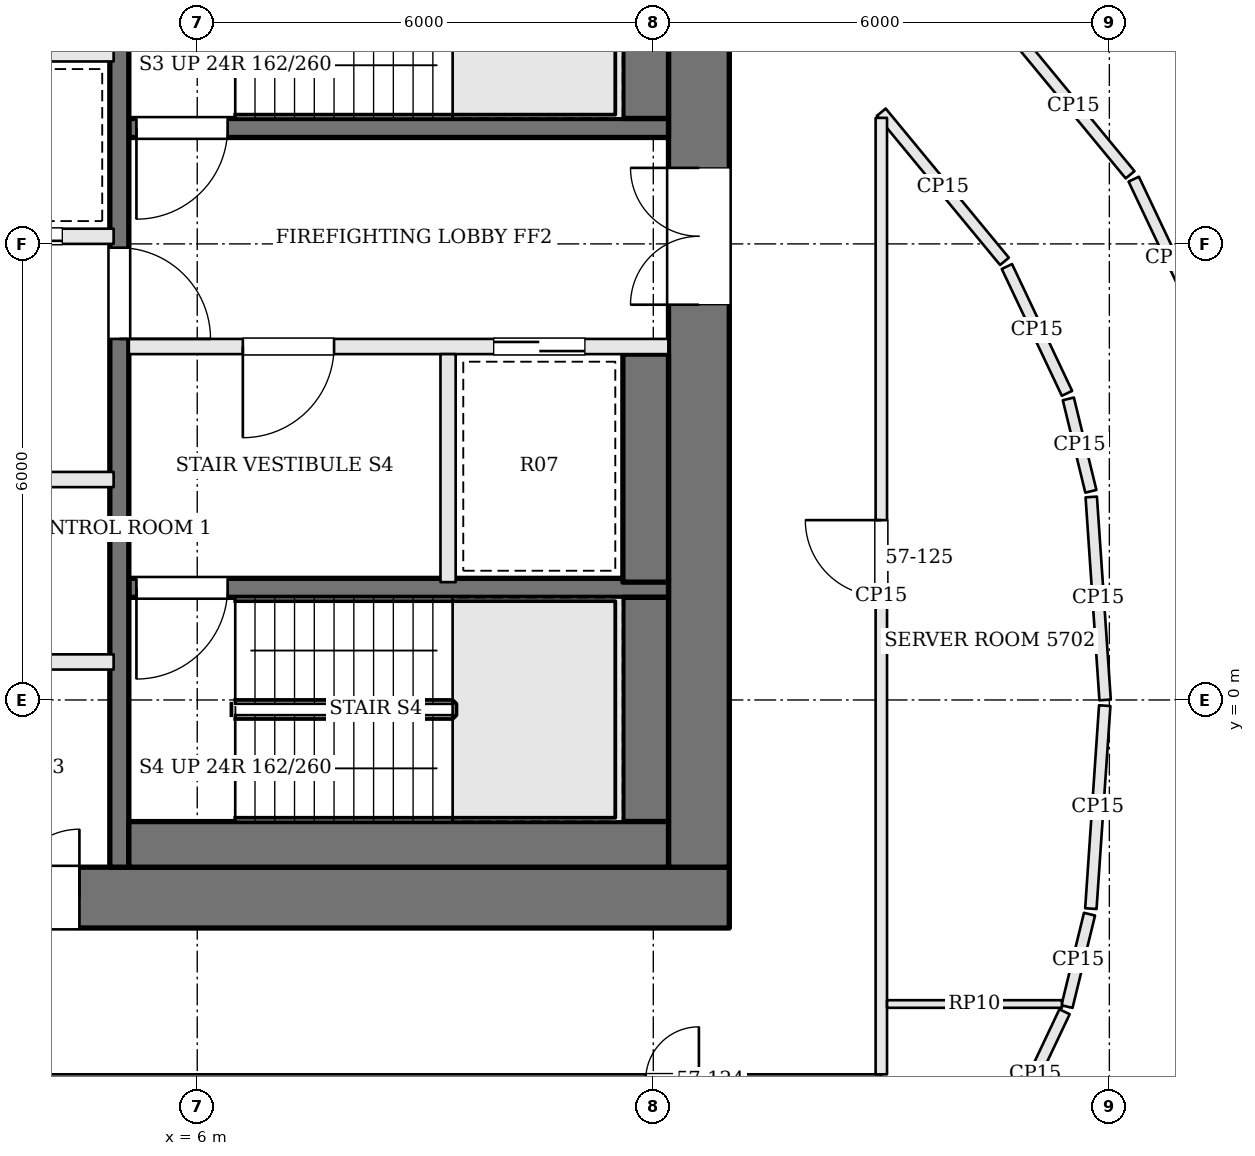
"""IFC4 building model, lengths in metres.
Left out: names, types, materials, properties, quantities, classifications, styles, units other than length and angle.
Written with IfcOpenShell. Run it as: python <this file> out.ifc"""

import sys

from ifc_helpers import new_model, si_unit, direction, frame, frame_2d, origin, place, context, subcontext, project, spatial, rectangle, extrude, element, fill, save


model = new_model("IFC4")
c1 = context("Model", 3, precision=1e-05, world=origin(), true_north=direction((0.0, 1.0)))
c2 = subcontext(c1, "Body", "Model", "MODEL_VIEW")
j1 = project(units=[si_unit("LENGTHUNIT", "METRE"), si_unit("PLANEANGLEUNIT", "RADIAN")], contexts=[c1])
p1 = place(None, origin())
s1 = spatial("IfcSite", under=j1, at=p1, CompositionType="ELEMENT")
p2 = place(p1, origin())
s2 = spatial("IfcBuilding", under=s1, at=p2, CompositionType="ELEMENT")
p3 = place(p2, frame((0.0, 0.0, 233.1)))
s3 = spatial("IfcBuildingStorey", under=s2, at=p3, CompositionType="ELEMENT", Elevation=233.1)
p4 = place(p3, frame((-13.0, -2.6, 0.0), z_axis=(0.0, 0.0, 1.0), x_axis=(1.0, 0.0, 0.0)))
e1 = element("IfcWall", 1, at=p4, inside=s3, PredefinedType="SHEAR", context=c2, shape_type="SweptSolid", body=[
    extrude(rectangle(XDim=26.0, YDim=0.8, at=frame_2d((13.0, 0.0))), origin(), (0.0, 0.0, 1.0), 3.9),
])
p5 = place(p4, frame((9.2, 0.0, 0.0)))
e2 = element("IfcOpeningElement", 2, at=p5, cuts=e1, PredefinedType="OPENING", context=c2, shape_type="SweptSolid", body=[
    extrude(rectangle(XDim=0.9, YDim=2.1, at=frame_2d((0.45, 1.05))), frame((0.0, 0.41, 0.0), z_axis=(0.0, -1.0, 0.0), x_axis=(1.0, 0.0, 0.0)), (0.0, 0.0, 1.0), 0.82),
])
p6 = place(p4, frame((12.3, 0.0, 0.0)))
e3 = element("IfcOpeningElement", 3, at=p6, cuts=e1, PredefinedType="OPENING", context=c2, shape_type="SweptSolid", body=[
    extrude(rectangle(XDim=0.9, YDim=2.1, at=frame_2d((0.45, 1.05))), frame((0.0, 0.41, 0.0), z_axis=(0.0, -1.0, 0.0), x_axis=(1.0, 0.0, 0.0)), (0.0, 0.0, 1.0), 0.82),
])
p7 = place(p4, frame((14.7, 0.0, 0.0)))
e4 = element("IfcOpeningElement", 4, at=p7, cuts=e1, PredefinedType="OPENING", context=c2, shape_type="SweptSolid", body=[
    extrude(rectangle(XDim=1.0, YDim=2.1, at=frame_2d((0.5, 1.05))), frame((0.0, 0.41, 0.0), z_axis=(0.0, -1.0, 0.0), x_axis=(1.0, 0.0, 0.0)), (0.0, 0.0, 1.0), 0.82),
])
p8 = place(p4, frame((16.55, 0.0, 0.0)))
e5 = element("IfcOpeningElement", 5, at=p8, cuts=e1, PredefinedType="OPENING", context=c2, shape_type="SweptSolid", body=[
    extrude(rectangle(XDim=0.9, YDim=2.1, at=frame_2d((0.45, 1.05))), frame((0.0, 0.41, 0.0), z_axis=(0.0, -1.0, 0.0), x_axis=(1.0, 0.0, 0.0)), (0.0, 0.0, 1.0), 0.82),
])
p9 = place(p3, frame((12.6, -2.2, 0.0), z_axis=(0.0, 0.0, 1.0), x_axis=(0.0, 1.0, 0.0)))
e6 = element("IfcWall", 6, at=p9, inside=s3, PredefinedType="SHEAR", context=c2, shape_type="SweptSolid", body=[
    extrude(rectangle(XDim=13.4, YDim=0.8, at=frame_2d((6.7, 0.0))), origin(), (0.0, 0.0, 1.0), 3.9),
])
p10 = place(p9, frame((7.4, 0.0, 0.0)))
e7 = element("IfcOpeningElement", 7, at=p10, cuts=e6, PredefinedType="OPENING", context=c2, shape_type="SweptSolid", body=[
    extrude(rectangle(XDim=1.8, YDim=2.1, at=frame_2d((0.9, 1.05))), frame((0.0, 0.41, 0.0), z_axis=(0.0, -1.0, 0.0), x_axis=(1.0, 0.0, 0.0)), (0.0, 0.0, 1.0), 0.82),
])
p11 = place(p3, frame((12.2, 7.525, 0.0), z_axis=(0.0, 0.0, 1.0), x_axis=(-1.0, 0.0, 0.0)))
e8 = element("IfcWall", 8, at=p11, inside=s3, PredefinedType="SOLIDWALL", context=c2, shape_type="SweptSolid", body=[
    extrude(rectangle(XDim=7.1, YDim=0.25, at=frame_2d((3.55, 0.0))), origin(), (0.0, 0.0, 1.0), 3.7),
])
p12 = place(p11, frame((5.8, 0.0, 0.0)))
e9 = element("IfcOpeningElement", 9, at=p12, cuts=e8, PredefinedType="OPENING", context=c2, shape_type="SweptSolid", body=[
    extrude(rectangle(XDim=1.2, YDim=2.1, at=frame_2d((0.6, 1.05))), frame((0.0, 0.135, 0.0), z_axis=(0.0, -1.0, 0.0), x_axis=(1.0, 0.0, 0.0)), (0.0, 0.0, 1.0), 0.27),
])
p13 = place(p3, frame((12.2, 4.65, 0.0), z_axis=(0.0, 0.0, 1.0), x_axis=(-1.0, 0.0, 0.0)))
e10 = element("IfcWall", 10, at=p13, inside=s3, PredefinedType="SOLIDWALL", context=c2, shape_type="SweptSolid", body=[
    extrude(rectangle(XDim=7.1, YDim=0.2, at=frame_2d((3.55, 0.0))), origin(), (0.0, 0.0, 1.0), 3.7),
])
p14 = place(p13, frame((4.4, 0.0, 0.0)))
e11 = element("IfcOpeningElement", 11, at=p14, cuts=e10, PredefinedType="OPENING", context=c2, shape_type="SweptSolid", body=[
    extrude(rectangle(XDim=1.2, YDim=2.1, at=frame_2d((0.6, 1.05))), frame((0.0, 0.11, 0.0), z_axis=(0.0, -1.0, 0.0), x_axis=(1.0, 0.0, 0.0)), (0.0, 0.0, 1.0), 0.22),
])
p15 = place(p13, frame((1.1, 0.0, 0.0)))
e12 = element("IfcOpeningElement", 12, at=p15, cuts=e10, PredefinedType="OPENING", context=c2, shape_type="SweptSolid", body=[
    extrude(rectangle(XDim=1.2, YDim=2.1, at=frame_2d((0.6, 1.05))), frame((0.0, 0.11, 0.0), z_axis=(0.0, -1.0, 0.0), x_axis=(1.0, 0.0, 0.0)), (0.0, 0.0, 1.0), 0.22),
])
p16 = place(p3, frame((12.2, 1.475, 0.0), z_axis=(0.0, 0.0, 1.0), x_axis=(-1.0, 0.0, 0.0)))
e13 = element("IfcWall", 13, at=p16, inside=s3, PredefinedType="SOLIDWALL", context=c2, shape_type="SweptSolid", body=[
    extrude(rectangle(XDim=7.1, YDim=0.25, at=frame_2d((3.55, 0.0))), origin(), (0.0, 0.0, 1.0), 3.7),
])
p17 = place(p16, frame((5.8, 0.0, 0.0)))
e14 = element("IfcOpeningElement", 14, at=p17, cuts=e13, PredefinedType="OPENING", context=c2, shape_type="SweptSolid", body=[
    extrude(rectangle(XDim=1.2, YDim=2.1, at=frame_2d((0.6, 1.05))), frame((0.0, 0.135, 0.0), z_axis=(0.0, -1.0, 0.0), x_axis=(1.0, 0.0, 0.0)), (0.0, 0.0, 1.0), 0.27),
])
p18 = place(p3, frame((9.3, 4.55, 0.0), z_axis=(0.0, 0.0, 1.0), x_axis=(0.0, -1.0, 0.0)))
e15 = element("IfcWall", 15, at=p18, inside=s3, PredefinedType="SOLIDWALL", context=c2, shape_type="SweptSolid", body=[
    extrude(rectangle(XDim=3.0, YDim=0.2, at=frame_2d((1.5, 0.0))), origin(), (0.0, 0.0, 1.0), 3.7),
])
p19 = place(p3, frame((4.975, 11.2, 0.0), z_axis=(0.0, 0.0, 1.0), x_axis=(0.0, -1.0, 0.0)))
e16 = element("IfcWall", 16, at=p19, inside=s3, PredefinedType="SOLIDWALL", context=c2, shape_type="SweptSolid", body=[
    extrude(rectangle(XDim=13.4, YDim=0.25, at=frame_2d((6.7, 0.0))), origin(), (0.0, 0.0, 1.0), 3.7),
])
p20 = place(p19, frame((5.25, 0.0, 0.0)))
e17 = element("IfcOpeningElement", 17, at=p20, cuts=e16, PredefinedType="OPENING", context=c2, shape_type="SweptSolid", body=[
    extrude(rectangle(XDim=1.2, YDim=2.1, at=frame_2d((0.6, 1.05))), frame((0.0, 0.135, 0.0), z_axis=(0.0, -1.0, 0.0), x_axis=(1.0, 0.0, 0.0)), (0.0, 0.0, 1.0), 0.27),
])
p21 = place(p3, frame((11.9, 10.6, 0.0), z_axis=(0.0, 0.0, 1.0), x_axis=(0.0, -1.0, 0.0)))
e18 = element("IfcWall", 18, at=p21, inside=s3, PredefinedType="SOLIDWALL", context=c2, shape_type="SweptSolid", body=[
    extrude(rectangle(XDim=2.95, YDim=0.6, at=frame_2d((1.475, 0.0))), origin(), (0.0, 0.0, 1.0), 3.7),
])
p22 = place(p3, frame((11.9, 4.55, 0.0), z_axis=(0.0, 0.0, 1.0), x_axis=(0.0, -1.0, 0.0)))
e19 = element("IfcWall", 19, at=p22, inside=s3, PredefinedType="SOLIDWALL", context=c2, shape_type="SweptSolid", body=[
    extrude(rectangle(XDim=3.0, YDim=0.6, at=frame_2d((1.5, 0.0))), origin(), (0.0, 0.0, 1.0), 3.7),
])
p23 = place(p3, frame((11.9, 1.35, 0.0), z_axis=(0.0, 0.0, 1.0), x_axis=(0.0, -1.0, 0.0)))
e20 = element("IfcWall", 20, at=p23, inside=s3, PredefinedType="SOLIDWALL", context=c2, shape_type="SweptSolid", body=[
    extrude(rectangle(XDim=2.95, YDim=0.6, at=frame_2d((1.475, 0.0))), origin(), (0.0, 0.0, 1.0), 3.7),
])
p24 = place(p3, frame((12.2, -1.9, 0.0), z_axis=(0.0, 0.0, 1.0), x_axis=(-1.0, 0.0, 0.0)))
e21 = element("IfcWall", 21, at=p24, inside=s3, PredefinedType="SOLIDWALL", context=c2, shape_type="SweptSolid", body=[
    extrude(rectangle(XDim=7.1, YDim=0.6, at=frame_2d((3.55, 0.0))), origin(), (0.0, 0.0, 1.0), 3.7),
])
p25 = place(p3, frame((-4.9, 0.5, 0.0), z_axis=(0.0, 0.0, 1.0), x_axis=(1.0, 0.0, 0.0)))
e22 = element("IfcWall", 22, at=p25, inside=s3, PredefinedType="SOLIDWALL", context=c2, shape_type="SweptSolid", body=[
    extrude(rectangle(XDim=9.8, YDim=0.2, at=frame_2d((4.9, 0.0))), origin(), (0.0, 0.0, 1.0), 3.7),
])
p26 = place(p3, frame((-4.9, 2.9, 0.0), z_axis=(0.0, 0.0, 1.0), x_axis=(1.0, 0.0, 0.0)))
e23 = element("IfcWall", 23, at=p26, inside=s3, PredefinedType="SOLIDWALL", context=c2, shape_type="SweptSolid", body=[
    extrude(rectangle(XDim=9.8, YDim=0.2, at=frame_2d((4.9, 0.0))), origin(), (0.0, 0.0, 1.0), 3.7),
])
p27 = place(p26, frame((0.675, 0.0, 0.0)))
e24 = element("IfcOpeningElement", 24, at=p27, cuts=e23, PredefinedType="OPENING", context=c2, shape_type="SweptSolid", body=[
    extrude(rectangle(XDim=1.1, YDim=2.1, at=frame_2d((0.55, 1.05))), frame((0.0, 0.11, 0.0), z_axis=(0.0, -1.0, 0.0), x_axis=(1.0, 0.0, 0.0)), (0.0, 0.0, 1.0), 0.22),
])
p28 = place(p26, frame((2.613, 0.0, 0.0)))
e25 = element("IfcOpeningElement", 25, at=p28, cuts=e23, PredefinedType="OPENING", context=c2, shape_type="SweptSolid", body=[
    extrude(rectangle(XDim=0.9, YDim=2.1, at=frame_2d((0.45, 1.05))), frame((0.0, 0.11, 0.0), z_axis=(0.0, -1.0, 0.0), x_axis=(1.0, 0.0, 0.0)), (0.0, 0.0, 1.0), 0.22),
])
p29 = place(p26, frame((4.35, 0.0, 0.0)))
e26 = element("IfcOpeningElement", 26, at=p29, cuts=e23, PredefinedType="OPENING", context=c2, shape_type="SweptSolid", body=[
    extrude(rectangle(XDim=1.1, YDim=2.1, at=frame_2d((0.55, 1.05))), frame((0.0, 0.11, 0.0), z_axis=(0.0, -1.0, 0.0), x_axis=(1.0, 0.0, 0.0)), (0.0, 0.0, 1.0), 0.22),
])
p30 = place(p26, frame((7.463, 0.0, 0.0)))
e27 = element("IfcOpeningElement", 27, at=p30, cuts=e23, PredefinedType="OPENING", context=c2, shape_type="SweptSolid", body=[
    extrude(rectangle(XDim=1.0, YDim=2.1, at=frame_2d((0.5, 1.05))), frame((0.0, 0.11, 0.0), z_axis=(0.0, -1.0, 0.0), x_axis=(1.0, 0.0, 0.0)), (0.0, 0.0, 1.0), 0.22),
])
p31 = place(p3, frame((-4.9, 6.1, 0.0), z_axis=(0.0, 0.0, 1.0), x_axis=(1.0, 0.0, 0.0)))
e28 = element("IfcWall", 28, at=p31, inside=s3, PredefinedType="SOLIDWALL", context=c2, shape_type="SweptSolid", body=[
    extrude(rectangle(XDim=9.8, YDim=0.2, at=frame_2d((4.9, 0.0))), origin(), (0.0, 0.0, 1.0), 3.7),
])
p32 = place(p31, frame((0.675, 0.0, 0.0)))
e29 = element("IfcOpeningElement", 29, at=p32, cuts=e28, PredefinedType="OPENING", context=c2, shape_type="SweptSolid", body=[
    extrude(rectangle(XDim=1.1, YDim=2.1, at=frame_2d((0.55, 1.05))), frame((0.0, 0.11, 0.0), z_axis=(0.0, -1.0, 0.0), x_axis=(1.0, 0.0, 0.0)), (0.0, 0.0, 1.0), 0.22),
])
p33 = place(p31, frame((3.125, 0.0, 0.0)))
e30 = element("IfcOpeningElement", 30, at=p33, cuts=e28, PredefinedType="OPENING", context=c2, shape_type="SweptSolid", body=[
    extrude(rectangle(XDim=1.1, YDim=2.1, at=frame_2d((0.55, 1.05))), frame((0.0, 0.11, 0.0), z_axis=(0.0, -1.0, 0.0), x_axis=(1.0, 0.0, 0.0)), (0.0, 0.0, 1.0), 0.22),
])
p34 = place(p31, frame((5.575, 0.0, 0.0)))
e31 = element("IfcOpeningElement", 31, at=p34, cuts=e28, PredefinedType="OPENING", context=c2, shape_type="SweptSolid", body=[
    extrude(rectangle(XDim=1.1, YDim=2.1, at=frame_2d((0.55, 1.05))), frame((0.0, 0.11, 0.0), z_axis=(0.0, -1.0, 0.0), x_axis=(1.0, 0.0, 0.0)), (0.0, 0.0, 1.0), 0.22),
])
p35 = place(p31, frame((8.025, 0.0, 0.0)))
e32 = element("IfcOpeningElement", 32, at=p35, cuts=e28, PredefinedType="OPENING", context=c2, shape_type="SweptSolid", body=[
    extrude(rectangle(XDim=1.1, YDim=2.1, at=frame_2d((0.55, 1.05))), frame((0.0, 0.11, 0.0), z_axis=(0.0, -1.0, 0.0), x_axis=(1.0, 0.0, 0.0)), (0.0, 0.0, 1.0), 0.22),
])
p36 = place(p3, frame((-4.9, 8.5, 0.0), z_axis=(0.0, 0.0, 1.0), x_axis=(1.0, 0.0, 0.0)))
e33 = element("IfcWall", 33, at=p36, inside=s3, PredefinedType="SOLIDWALL", context=c2, shape_type="SweptSolid", body=[
    extrude(rectangle(XDim=9.8, YDim=0.2, at=frame_2d((4.9, 0.0))), origin(), (0.0, 0.0, 1.0), 3.7),
])
for number, where, z_axis, x_axis in (
    (34, (18.353, -6.784, 0.0), (0.0, 0.0, 1.0), (0.428, 0.904, 0.0)),
    (35, (19.305, 4.773, 0.0), (0.0, 0.0, 1.0), (-0.428, 0.904, 0.0)),
):
    element("IfcWall", number, at=place(p3, frame(where, z_axis=z_axis, x_axis=x_axis)), inside=s3, PredefinedType="PARTITIONING", context=c2, shape_type="SweptSolid", body=[
        extrude(rectangle(XDim=2.3, YDim=0.15, at=frame_2d((1.15, 0.0))), origin(), (0.0, 0.0, 1.0), 3.084),
    ])
p37 = place(p3, frame((18.273, 6.909, 0.0), z_axis=(0.0, 0.0, 1.0), x_axis=(-0.63653648943, 0.771246586783, 0.0)))
e36 = element("IfcWall", 36, at=p37, inside=s3, PredefinedType="PARTITIONING", context=c2, shape_type="SweptSolid", body=[
    extrude(rectangle(XDim=2.342, YDim=0.15, at=frame_2d((1.171, 0.0))), origin(), (0.0, 0.0, 1.0), 3.084),
])
p38 = place(p3, frame((15.0, 7.733, 0.0), z_axis=(0.0, 0.0, 1.0), x_axis=(0.636601263488, -0.771193121938, 0.0)))
e37 = element("IfcWall", 37, at=p38, inside=s3, PredefinedType="PARTITIONING", context=c2, shape_type="SweptSolid", body=[
    extrude(rectangle(XDim=2.545, YDim=0.15, at=frame_2d((1.272, 0.0))), origin(), (0.0, 0.0, 1.0), 3.084),
])
p39 = place(p3, frame((16.652, 5.702, 0.0), z_axis=(0.0, 0.0, 1.0), x_axis=(0.428126129773, -0.903718992279, 0.0)))
e38 = element("IfcWall", 38, at=p39, inside=s3, PredefinedType="PARTITIONING", context=c2, shape_type="SweptSolid", body=[
    extrude(rectangle(XDim=1.846, YDim=0.15, at=frame_2d((0.923, 0.0))), origin(), (0.0, 0.0, 1.0), 3.084),
])
p40 = place(p3, frame((17.46, 3.961, 0.0), z_axis=(0.0, 0.0, 1.0), x_axis=(0.236655249498, -0.971593687137, 0.0)))
e39 = element("IfcWall", 39, at=p40, inside=s3, PredefinedType="PARTITIONING", context=c2, shape_type="SweptSolid", body=[
    extrude(rectangle(XDim=1.251, YDim=0.15, at=frame_2d((0.626, 0.0))), origin(), (0.0, 0.0, 1.0), 3.084),
])
p41 = place(p3, frame((17.762, 2.67, 0.0), z_axis=(0.0, 0.0, 1.0), x_axis=(0.068135311644, -0.997676089373, 0.0)))
e40 = element("IfcWall", 40, at=p41, inside=s3, PredefinedType="PARTITIONING", context=c2, shape_type="SweptSolid", body=[
    extrude(rectangle(XDim=2.677, YDim=0.15, at=frame_2d((1.338, 0.0))), origin(), (0.0, 0.0, 1.0), 3.084),
])
p42 = place(p3, frame((17.939, -0.075, 0.0), z_axis=(0.0, 0.0, 1.0), x_axis=(-0.068226099283, -0.99766988497, 0.0)))
e41 = element("IfcWall", 41, at=p42, inside=s3, PredefinedType="PARTITIONING", context=c2, shape_type="SweptSolid", body=[
    extrude(rectangle(XDim=2.677, YDim=0.15, at=frame_2d((1.338, 0.0))), origin(), (0.0, 0.0, 1.0), 3.084),
])
p43 = place(p3, frame((17.739, -2.818, 0.0), z_axis=(0.0, 0.0, 1.0), x_axis=(-0.236884307907, -0.971537865792, 0.0)))
e42 = element("IfcWall", 42, at=p43, inside=s3, PredefinedType="PARTITIONING", context=c2, shape_type="SweptSolid", body=[
    extrude(rectangle(XDim=1.251, YDim=0.15, at=frame_2d((0.625, 0.0))), origin(), (0.0, 0.0, 1.0), 3.084),
])
p44 = place(p3, frame((17.41, -4.102, 0.0), z_axis=(0.0, 0.0, 1.0), x_axis=(-0.428074720318, -0.903743345107, 0.0)))
e43 = element("IfcWall", 43, at=p44, inside=s3, PredefinedType="PARTITIONING", context=c2, shape_type="SweptSolid", body=[
    extrude(rectangle(XDim=1.806, YDim=0.15, at=frame_2d((0.903, 0.0))), origin(), (0.0, 0.0, 1.0), 3.084),
])
p45 = place(p3, frame((-14.925, -5.0, 0.0), z_axis=(0.0, 0.0, 1.0), x_axis=(1.0, 0.0, 0.0)))
e44 = element("IfcWall", 44, at=p45, inside=s3, PredefinedType="PARTITIONING", context=c2, shape_type="SweptSolid", body=[
    extrude(rectangle(XDim=29.925, YDim=0.15, at=frame_2d((14.962, 0.0))), origin(), (0.0, 0.0, 1.0), 3.084),
])
p46 = place(p45, frame((2.175, 0.0, 0.0)))
e45 = element("IfcOpeningElement", 45, at=p46, cuts=e44, PredefinedType="OPENING", context=c2, shape_type="SweptSolid", body=[
    extrude(rectangle(XDim=1.0, YDim=2.4, at=frame_2d((0.5, 1.2))), frame((0.0, 0.085, 0.0), z_axis=(0.0, -1.0, 0.0), x_axis=(1.0, 0.0, 0.0)), (0.0, 0.0, 1.0), 0.17),
])
p47 = place(p45, frame((14.025, 0.0, 0.0)))
e46 = element("IfcOpeningElement", 46, at=p47, cuts=e44, PredefinedType="OPENING", context=c2, shape_type="SweptSolid", body=[
    extrude(rectangle(XDim=1.8, YDim=2.1, at=frame_2d((0.9, 1.05))), frame((0.0, 0.085, 0.0), z_axis=(0.0, -1.0, 0.0), x_axis=(1.0, 0.0, 0.0)), (0.0, 0.0, 1.0), 0.17),
])
p48 = place(p45, frame((26.825, 0.0, 0.0)))
e47 = element("IfcOpeningElement", 47, at=p48, cuts=e44, PredefinedType="OPENING", context=c2, shape_type="SweptSolid", body=[
    extrude(rectangle(XDim=0.7, YDim=2.1, at=frame_2d((0.35, 1.05))), frame((0.0, 0.085, 0.0), z_axis=(0.0, -1.0, 0.0), x_axis=(1.0, 0.0, 0.0)), (0.0, 0.0, 1.0), 0.17),
])
p49 = place(p3, frame((15.0, -4.925, 0.0), z_axis=(0.0, 0.0, 1.0), x_axis=(0.0, 1.0, 0.0)))
e48 = element("IfcWall", 48, at=p49, inside=s3, PredefinedType="PARTITIONING", context=c2, shape_type="SweptSolid", body=[
    extrude(rectangle(XDim=12.583, YDim=0.15, at=frame_2d((6.292, 0.0))), origin(), (0.0, 0.0, 1.0), 3.084),
])
p50 = place(p49, frame((6.291, 0.0, 0.0)))
e49 = element("IfcOpeningElement", 49, at=p50, cuts=e48, PredefinedType="OPENING", context=c2, shape_type="SweptSolid", body=[
    extrude(rectangle(XDim=1.0, YDim=2.1, at=frame_2d((0.5, 1.05))), frame((0.0, 0.085, 0.0), z_axis=(0.0, -1.0, 0.0), x_axis=(1.0, 0.0, 0.0)), (0.0, 0.0, 1.0), 0.17),
])
p51 = place(p3, frame((15.075, -4.0, 0.0), z_axis=(0.0, 0.0, 1.0), x_axis=(1.0, 0.0, 0.0)))
e50 = element("IfcWall", 50, at=p51, inside=s3, PredefinedType="PARTITIONING", context=c2, shape_type="SweptSolid", body=[
    extrude(rectangle(XDim=2.301, YDim=0.1, at=frame_2d((1.15, 0.0))), origin(), (0.0, 0.0, 1.0), 3.084),
])
p52 = place(p10, origin())
e51 = element("IfcDoor", 51, at=p52, inside=s3, OperationType="DOUBLE_DOOR_SINGLE_SWING", PredefinedType="DOOR", context=c2, shape_type="SweptSolid", body=[
    extrude(rectangle(XDim=1.8, YDim=2.1, at=frame_2d((0.9, 1.05))), frame((0.0, 0.025, 0.0), z_axis=(0.0, -1.0, 0.0), x_axis=(1.0, 0.0, 0.0)), (0.0, 0.0, 1.0), 0.05),
])
fill(e7, e51)
p53 = place(p20, origin())
e52 = element("IfcDoor", 52, at=p53, inside=s3, OperationType="SINGLE_SWING_RIGHT", PredefinedType="DOOR", context=c2, shape_type="SweptSolid", body=[
    extrude(rectangle(XDim=1.2, YDim=2.1, at=frame_2d((0.6, 1.05))), frame((0.0, 0.025, 0.0), z_axis=(0.0, -1.0, 0.0), x_axis=(1.0, 0.0, 0.0)), (0.0, 0.0, 1.0), 0.05),
])
fill(e17, e52)
p54 = place(p14, origin())
e53 = element("IfcDoor", 53, at=p54, inside=s3, OperationType="SINGLE_SWING_RIGHT", PredefinedType="DOOR", context=c2, shape_type="SweptSolid", body=[
    extrude(rectangle(XDim=1.2, YDim=2.1, at=frame_2d((0.6, 1.05))), frame((0.0, 0.025, 0.0), z_axis=(0.0, -1.0, 0.0), x_axis=(1.0, 0.0, 0.0)), (0.0, 0.0, 1.0), 0.05),
])
fill(e11, e53)
p55 = place(p12, origin())
e54 = element("IfcDoor", 54, at=p55, inside=s3, OperationType="SINGLE_SWING_RIGHT", PredefinedType="DOOR", context=c2, shape_type="SweptSolid", body=[
    extrude(rectangle(XDim=1.2, YDim=2.1, at=frame_2d((0.6, 1.05))), frame((0.0, 0.025, 0.0), z_axis=(0.0, -1.0, 0.0), x_axis=(1.0, 0.0, 0.0)), (0.0, 0.0, 1.0), 0.05),
])
fill(e9, e54)
p56 = place(p17, origin())
e55 = element("IfcDoor", 55, at=p56, inside=s3, OperationType="SINGLE_SWING_RIGHT", PredefinedType="DOOR", context=c2, shape_type="SweptSolid", body=[
    extrude(rectangle(XDim=1.2, YDim=2.1, at=frame_2d((0.6, 1.05))), frame((0.0, 0.025, 0.0), z_axis=(0.0, -1.0, 0.0), x_axis=(1.0, 0.0, 0.0)), (0.0, 0.0, 1.0), 0.05),
])
fill(e14, e55)
p57 = place(p15, origin())
e56 = element("IfcDoor", 56, at=p57, inside=s3, OperationType="SLIDING_TO_RIGHT", PredefinedType="DOOR", context=c2, shape_type="SweptSolid", body=[
    extrude(rectangle(XDim=1.2, YDim=2.1, at=frame_2d((0.6, 1.05))), frame((0.0, 0.025, 0.0), z_axis=(0.0, -1.0, 0.0), x_axis=(1.0, 0.0, 0.0)), (0.0, 0.0, 1.0), 0.05),
])
fill(e12, e56)
p58 = place(p35, origin())
e57 = element("IfcDoor", 57, at=p58, inside=s3, OperationType="SLIDING_TO_LEFT", PredefinedType="DOOR", context=c2, shape_type="SweptSolid", body=[
    extrude(rectangle(XDim=1.1, YDim=2.1, at=frame_2d((0.55, 1.05))), frame((0.0, 0.025, 0.0), z_axis=(0.0, -1.0, 0.0), x_axis=(1.0, 0.0, 0.0)), (0.0, 0.0, 1.0), 0.05),
])
fill(e32, e57)
p59 = place(p8, origin())
e58 = element("IfcDoor", 58, at=p59, inside=s3, OperationType="SINGLE_SWING_RIGHT", PredefinedType="DOOR", context=c2, shape_type="SweptSolid", body=[
    extrude(rectangle(XDim=0.9, YDim=2.1, at=frame_2d((0.45, 1.05))), frame((0.0, 0.025, 0.0), z_axis=(0.0, -1.0, 0.0), x_axis=(1.0, 0.0, 0.0)), (0.0, 0.0, 1.0), 0.05),
])
fill(e5, e58)
p60 = place(p50, origin())
e59 = element("IfcDoor", 59, at=p60, inside=s3, OperationType="SINGLE_SWING_RIGHT", PredefinedType="DOOR", context=c2, shape_type="SweptSolid", body=[
    extrude(rectangle(XDim=1.0, YDim=2.1, at=frame_2d((0.5, 1.05))), frame((0.0, 0.025, 0.0), z_axis=(0.0, -1.0, 0.0), x_axis=(1.0, 0.0, 0.0)), (0.0, 0.0, 1.0), 0.05),
])
fill(e49, e59)
save(model, sys.argv[1])
